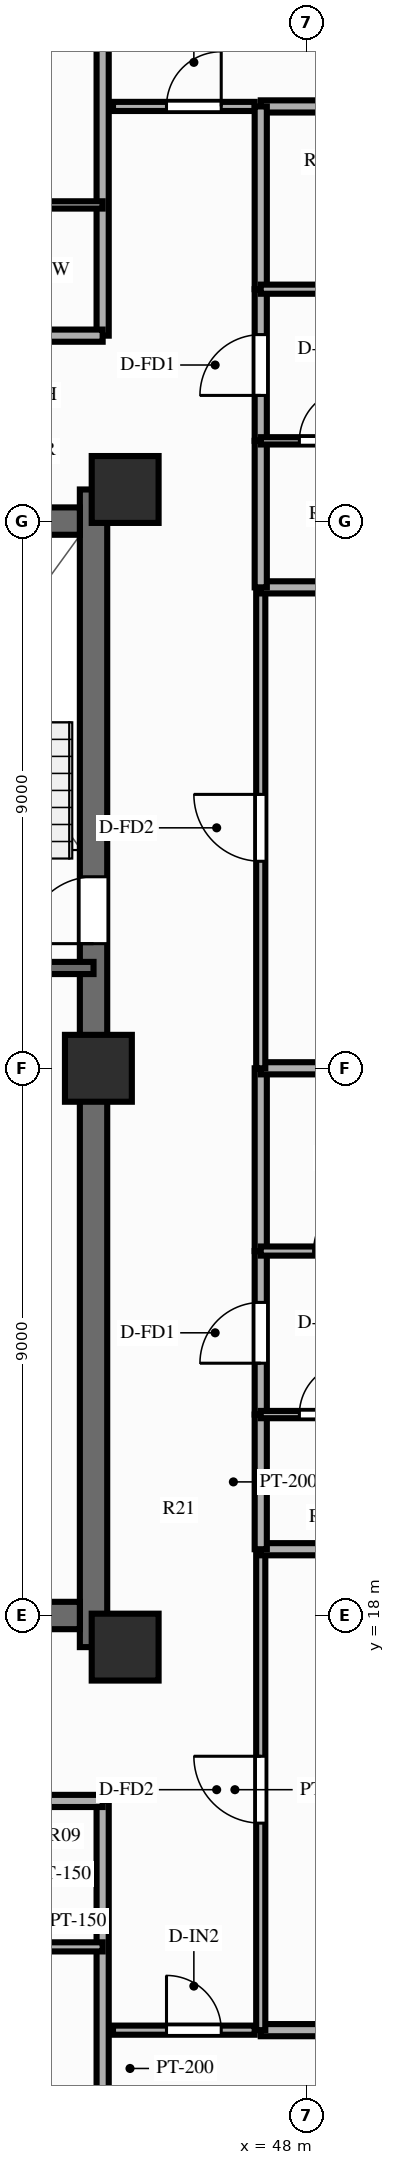
"""IFC4 building model, lengths in metres.
Left out: names, types, materials, properties, quantities, classifications, styles, units other than length and angle.
Written with IfcOpenShell. Run it as: python <this file> out.ifc"""

import sys

from ifc_helpers import new_model, si_unit, direction, frame, frame_2d, origin, origin_2d, place, context, subcontext, project, spatial, rectangle, extrude, source, transform, mapped, element, fill, save


model = new_model("IFC4")
c1 = context("Model", 3, precision=1e-05, world=origin(), true_north=direction((0.0, 1.0)))
c2 = subcontext(c1, "Body", "Model", "MODEL_VIEW")
j1 = project(units=[si_unit("LENGTHUNIT", "METRE"), si_unit("PLANEANGLEUNIT", "RADIAN")], contexts=[c1])
p1 = place(None, origin())
s1 = spatial("IfcSite", under=j1, at=p1, CompositionType="ELEMENT")
p2 = place(p1, origin())
s2 = spatial("IfcBuilding", under=s1, at=p2, CompositionType="ELEMENT")
p3 = place(p2, frame((0.0, 0.0, 186.7)))
s3 = spatial("IfcBuildingStorey", under=s2, at=p3, CompositionType="ELEMENT", Elevation=186.7)
p4 = place(p3, frame((44.5, 17.48, 0.0), z_axis=(0.0, 0.0, 1.0), x_axis=(0.0, 1.0, 0.0)))
e1 = element("IfcWall", 1, at=p4, inside=s3, PredefinedType="SHEAR", context=c2, shape_type="SweptSolid", body=[
    extrude(rectangle(XDim=19.04, YDim=0.45, at=frame_2d((9.52, 0.0))), origin(), (0.0, 0.0, 1.0), 3.0),
])
p5 = place(p4, frame((12.67, 0.0, 0.0), z_axis=(0.0, 0.0, 1.0), x_axis=(-1.0, 0.0, 0.0)))
e2 = element("IfcOpeningElement", 2, at=p5, cuts=e1, PredefinedType="OPENING", context=c2, shape_type="SweptSolid", body=[
    extrude(rectangle(XDim=1.1, YDim=2.15, at=frame_2d((0.55, 1.075))), frame((0.0, 0.237, 0.0), z_axis=(0.0, -1.0, 0.0), x_axis=(1.0, 0.0, 0.0)), (0.0, 0.0, 1.0), 0.474),
])
p6 = place(p3, frame((31.725, 18.0, 0.0), z_axis=(0.0, 0.0, 1.0), x_axis=(1.0, 0.0, 0.0)))
e3 = element("IfcWall", 3, at=p6, inside=s3, PredefinedType="SHEAR", context=c2, shape_type="SweptSolid", body=[
    extrude(rectangle(XDim=12.55, YDim=0.45, at=frame_2d((6.275, 0.0))), origin(), (0.0, 0.0, 1.0), 3.0),
])
p7 = place(p3, frame((31.725, 36.0, 0.0), z_axis=(0.0, 0.0, 1.0), x_axis=(1.0, 0.0, 0.0)))
e4 = element("IfcWall", 4, at=p7, inside=s3, PredefinedType="SHEAR", context=c2, shape_type="SweptSolid", body=[
    extrude(rectangle(XDim=12.55, YDim=0.45, at=frame_2d((6.275, 0.0))), origin(), (0.0, 0.0, 1.0), 3.0),
])
p8 = place(p7, frame((5.225, 0.0, 0.0), z_axis=(0.0, 0.0, 1.0), x_axis=(-1.0, 0.0, 0.0)))
e5 = element("IfcOpeningElement", 5, at=p8, cuts=e4, PredefinedType="OPENING", context=c2, shape_type="SweptSolid", body=[
    extrude(rectangle(XDim=1.4, YDim=2.15, at=frame_2d((0.7, 1.075))), frame((0.0, 0.237, 0.0), z_axis=(0.0, -1.0, 0.0), x_axis=(1.0, 0.0, 0.0)), (0.0, 0.0, 1.0), 0.474),
])
m1 = source(origin(), c2, "Body", "SweptSolid", [
    extrude(rectangle(XDim=1.1, YDim=1.1, at=origin_2d()), origin(), (0.0, 0.0, 1.0), 3.0),
])
for number, where, z_axis, x_axis in (
    (6, (45.02, 17.48, 0.0), (0.0, 0.0, 1.0), (1.0, 0.0, 0.0)),
    (7, (45.02, 36.52, 0.0), (0.0, 0.0, 1.0), (1.0, 0.0, 0.0)),
    (8, (44.58, 27.0, 0.0), (0.0, 0.0, 1.0), (1.0, 0.0, 0.0)),
):
    element("IfcColumn", number, at=place(p3, frame(where, z_axis=z_axis, x_axis=x_axis)), inside=s3, PredefinedType="COLUMN", context=c2, shape_type="MappedRepresentation", body=[
        mapped(m1, transform((0.0, 0.0, 0.0), scale=1.0)),
    ])
p9 = place(p3, frame((40.57, 28.65, 0.0), z_axis=(0.0, 0.0, 1.0), x_axis=(1.0, 0.0, 0.0)))
e9 = element("IfcWall", 9, at=p9, inside=s3, PredefinedType="SOLIDWALL", context=c2, shape_type="SweptSolid", body=[
    extrude(rectangle(XDim=3.93, YDim=0.2, at=frame_2d((1.965, 0.0))), origin(), (0.0, 0.0, 1.0), 2.79),
])
p10 = place(p3, frame((44.82, 11.18, 0.0), z_axis=(0.0, 0.0, 1.0), x_axis=(1.0, 0.0, 0.0)))
e10 = element("IfcWall", 10, at=p10, inside=s3, PredefinedType="PARTITIONING", context=c2, shape_type="SweptSolid", body=[
    extrude(rectangle(XDim=2.33, YDim=0.15, at=frame_2d((1.165, 0.0))), origin(), (0.0, 0.0, 1.0), 2.79),
])
p11 = place(p10, frame((0.88, 0.0, 0.0)))
e11 = element("IfcOpeningElement", 11, at=p11, cuts=e10, PredefinedType="OPENING", context=c2, shape_type="SweptSolid", body=[
    extrude(rectangle(XDim=0.9, YDim=2.1, at=frame_2d((0.45, 1.05))), frame((0.0, 0.087, 0.0), z_axis=(0.0, -1.0, 0.0), x_axis=(1.0, 0.0, 0.0)), (0.0, 0.0, 1.0), 0.174),
])
p12 = place(p3, frame((44.82, 42.82, 0.0), z_axis=(0.0, 0.0, 1.0), x_axis=(1.0, 0.0, 0.0)))
e12 = element("IfcWall", 12, at=p12, inside=s3, PredefinedType="PARTITIONING", context=c2, shape_type="SweptSolid", body=[
    extrude(rectangle(XDim=2.33, YDim=0.15, at=frame_2d((1.165, 0.0))), origin(), (0.0, 0.0, 1.0), 2.79),
])
p13 = place(p12, frame((0.88, 0.0, 0.0)))
e13 = element("IfcOpeningElement", 13, at=p13, cuts=e12, PredefinedType="OPENING", context=c2, shape_type="SweptSolid", body=[
    extrude(rectangle(XDim=0.9, YDim=2.1, at=frame_2d((0.45, 1.05))), frame((0.0, 0.087, 0.0), z_axis=(0.0, -1.0, 0.0), x_axis=(1.0, 0.0, 0.0)), (0.0, 0.0, 1.0), 0.174),
])
p14 = place(p3, frame((44.65, 14.95, 0.0), z_axis=(0.0, 0.0, 1.0), x_axis=(0.0, -1.0, 0.0)))
e14 = element("IfcWall", 14, at=p14, inside=s3, PredefinedType="PARTITIONING", context=c2, shape_type="SweptSolid", body=[
    extrude(rectangle(XDim=8.8, YDim=0.2, at=frame_2d((4.4, 0.0))), origin(), (0.0, 0.0, 1.0), 2.39),
])
p15 = place(p3, frame((42.022, 14.95, 0.0), z_axis=(0.0, 0.0, 1.0), x_axis=(1.0, 0.0, 0.0)))
e15 = element("IfcWall", 15, at=p15, inside=s3, PredefinedType="PARTITIONING", context=c2, shape_type="SweptSolid", body=[
    extrude(rectangle(XDim=2.628, YDim=0.2, at=frame_2d((1.314, 0.0))), origin(), (0.0, 0.0, 1.0), 2.79),
])
p16 = place(p3, frame((42.022, 12.55, 0.0), z_axis=(0.0, 0.0, 1.0), x_axis=(1.0, 0.0, 0.0)))
e16 = element("IfcWall", 16, at=p16, inside=s3, PredefinedType="PARTITIONING", context=c2, shape_type="SweptSolid", body=[
    extrude(rectangle(XDim=2.628, YDim=0.15, at=frame_2d((1.314, 0.0))), origin(), (0.0, 0.0, 1.0), 2.79),
])
p17 = place(p3, frame((44.65, 39.05, 0.0), z_axis=(0.0, 0.0, 1.0), x_axis=(0.0, 1.0, 0.0)))
e17 = element("IfcWall", 17, at=p17, inside=s3, PredefinedType="PARTITIONING", context=c2, shape_type="SweptSolid", body=[
    extrude(rectangle(XDim=8.8, YDim=0.2, at=frame_2d((4.4, 0.0))), origin(), (0.0, 0.0, 1.0), 2.39),
])
p18 = place(p3, frame((42.188, 39.05, 0.0), z_axis=(0.0, 0.0, 1.0), x_axis=(1.0, 0.0, 0.0)))
e18 = element("IfcWall", 18, at=p18, inside=s3, PredefinedType="PARTITIONING", context=c2, shape_type="SweptSolid", body=[
    extrude(rectangle(XDim=2.462, YDim=0.2, at=frame_2d((1.231, 0.0))), origin(), (0.0, 0.0, 1.0), 2.79),
])
p19 = place(p3, frame((42.188, 41.2, 0.0), z_axis=(0.0, 0.0, 1.0), x_axis=(1.0, 0.0, 0.0)))
e19 = element("IfcWall", 19, at=p19, inside=s3, PredefinedType="PARTITIONING", context=c2, shape_type="SweptSolid", body=[
    extrude(rectangle(XDim=2.462, YDim=0.12, at=frame_2d((1.231, 0.0))), origin(), (0.0, 0.0, 1.0), 2.79),
])
for number, where, z_axis, x_axis in (
    (20, (47.25, 11.18, 0.0), (0.0, 0.0, 1.0), (1.0, 0.0, 0.0)),
    (21, (47.25, 42.82, 0.0), (0.0, 0.0, 1.0), (1.0, 0.0, 0.0)),
):
    element("IfcWall", number, at=place(p3, frame(where, z_axis=z_axis, x_axis=x_axis)), inside=s3, PredefinedType="PARTITIONING", context=c2, shape_type="SweptSolid", body=[
        extrude(rectangle(XDim=10.85, YDim=0.2, at=frame_2d((5.425, 0.0))), origin(), (0.0, 0.0, 1.0), 2.79),
    ])
p20 = place(p3, frame((47.25, 11.18, 0.0), z_axis=(0.0, 0.0, 1.0), x_axis=(0.0, 1.0, 0.0)))
e22 = element("IfcWall", 22, at=p20, inside=s3, PredefinedType="PARTITIONING", context=c2, shape_type="SweptSolid", body=[
    extrude(rectangle(XDim=7.91, YDim=0.15, at=frame_2d((3.955, 0.0))), origin(), (0.0, 0.0, 1.0), 2.79),
])
p21 = place(p20, frame((3.405, 0.0, 0.0)))
e23 = element("IfcOpeningElement", 23, at=p21, cuts=e22, PredefinedType="OPENING", context=c2, shape_type="SweptSolid", body=[
    extrude(rectangle(XDim=1.1, YDim=2.15, at=frame_2d((0.55, 1.075))), frame((0.0, 0.087, 0.0), z_axis=(0.0, -1.0, 0.0), x_axis=(1.0, 0.0, 0.0)), (0.0, 0.0, 1.0), 0.174),
])
p22 = place(p3, frame((47.25, 19.09, 0.0), z_axis=(0.0, 0.0, 1.0), x_axis=(1.0, 0.0, 0.0)))
e24 = element("IfcWall", 24, at=p22, inside=s3, PredefinedType="PARTITIONING", context=c2, shape_type="SweptSolid", body=[
    extrude(rectangle(XDim=10.85, YDim=0.2, at=frame_2d((5.425, 0.0))), origin(), (0.0, 0.0, 1.0), 2.79),
])
p23 = place(p3, frame((47.25, 19.09, 0.0), z_axis=(0.0, 0.0, 1.0), x_axis=(0.0, 1.0, 0.0)))
e25 = element("IfcWall", 25, at=p23, inside=s3, PredefinedType="PARTITIONING", context=c2, shape_type="SweptSolid", body=[
    extrude(rectangle(XDim=2.215, YDim=0.2, at=frame_2d((1.107, 0.0))), origin(), (0.0, 0.0, 1.0), 2.79),
])
p24 = place(p3, frame((47.25, 21.305, 0.0), z_axis=(0.0, 0.0, 1.0), x_axis=(0.0, 1.0, 0.0)))
e26 = element("IfcWall", 26, at=p24, inside=s3, PredefinedType="PARTITIONING", context=c2, shape_type="SweptSolid", body=[
    extrude(rectangle(XDim=2.689, YDim=0.2, at=frame_2d((1.345, 0.0))), origin(), (0.0, 0.0, 1.0), 2.79),
])
p25 = place(p24, frame((0.845, 0.0, 0.0)))
e27 = element("IfcOpeningElement", 27, at=p25, cuts=e26, PredefinedType="OPENING", context=c2, shape_type="SweptSolid", body=[
    extrude(rectangle(XDim=1.0, YDim=2.15, at=frame_2d((0.5, 1.075))), frame((0.0, 0.112, 0.0), z_axis=(0.0, -1.0, 0.0), x_axis=(1.0, 0.0, 0.0)), (0.0, 0.0, 1.0), 0.224),
])
p26 = place(p3, frame((47.25, 23.994, 0.0), z_axis=(0.0, 0.0, 1.0), x_axis=(0.0, 1.0, 0.0)))
e28 = element("IfcWall", 28, at=p26, inside=s3, PredefinedType="PARTITIONING", context=c2, shape_type="SweptSolid", body=[
    extrude(rectangle(XDim=3.006, YDim=0.2, at=frame_2d((1.503, 0.0))), origin(), (0.0, 0.0, 1.0), 2.79),
])
p27 = place(p3, frame((47.25, 21.305, 0.0), z_axis=(0.0, 0.0, 1.0), x_axis=(1.0, 0.0, 0.0)))
e29 = element("IfcWall", 29, at=p27, inside=s3, PredefinedType="PARTITIONING", context=c2, shape_type="SweptSolid", body=[
    extrude(rectangle(XDim=2.12, YDim=0.12, at=frame_2d((1.06, 0.0))), origin(), (0.0, 0.0, 1.0), 2.79),
])
p28 = place(p27, frame((0.635, 0.0, 0.0)))
e30 = element("IfcOpeningElement", 30, at=p28, cuts=e29, PredefinedType="OPENING", context=c2, shape_type="SweptSolid", body=[
    extrude(rectangle(XDim=0.85, YDim=2.05, at=frame_2d((0.425, 1.025))), frame((0.0, 0.072, 0.0), z_axis=(0.0, -1.0, 0.0), x_axis=(1.0, 0.0, 0.0)), (0.0, 0.0, 1.0), 0.144),
])
p29 = place(p3, frame((47.25, 23.994, 0.0), z_axis=(0.0, 0.0, 1.0), x_axis=(1.0, 0.0, 0.0)))
e31 = element("IfcWall", 31, at=p29, inside=s3, PredefinedType="PARTITIONING", context=c2, shape_type="SweptSolid", body=[
    extrude(rectangle(XDim=2.64, YDim=0.15, at=frame_2d((1.32, 0.0))), origin(), (0.0, 0.0, 1.0), 2.79),
])
p30 = place(p29, frame((0.87, 0.0, 0.0)))
e32 = element("IfcOpeningElement", 32, at=p30, cuts=e31, PredefinedType="OPENING", context=c2, shape_type="SweptSolid", body=[
    extrude(rectangle(XDim=0.9, YDim=2.1, at=frame_2d((0.45, 1.05))), frame((0.0, 0.087, 0.0), z_axis=(0.0, -1.0, 0.0), x_axis=(1.0, 0.0, 0.0)), (0.0, 0.0, 1.0), 0.174),
])
p31 = place(p3, frame((47.25, 27.0, 0.0), z_axis=(0.0, 0.0, 1.0), x_axis=(1.0, 0.0, 0.0)))
e33 = element("IfcWall", 33, at=p31, inside=s3, PredefinedType="PARTITIONING", context=c2, shape_type="SweptSolid", body=[
    extrude(rectangle(XDim=10.85, YDim=0.2, at=frame_2d((5.425, 0.0))), origin(), (0.0, 0.0, 1.0), 2.79),
])
p32 = place(p3, frame((47.25, 27.0, 0.0), z_axis=(0.0, 0.0, 1.0), x_axis=(0.0, 1.0, 0.0)))
e34 = element("IfcWall", 34, at=p32, inside=s3, PredefinedType="PARTITIONING", context=c2, shape_type="SweptSolid", body=[
    extrude(rectangle(XDim=7.91, YDim=0.15, at=frame_2d((3.955, 0.0))), origin(), (0.0, 0.0, 1.0), 2.79),
])
p33 = place(p32, frame((3.405, 0.0, 0.0)))
e35 = element("IfcOpeningElement", 35, at=p33, cuts=e34, PredefinedType="OPENING", context=c2, shape_type="SweptSolid", body=[
    extrude(rectangle(XDim=1.1, YDim=2.15, at=frame_2d((0.55, 1.075))), frame((0.0, 0.087, 0.0), z_axis=(0.0, -1.0, 0.0), x_axis=(1.0, 0.0, 0.0)), (0.0, 0.0, 1.0), 0.174),
])
p34 = place(p3, frame((47.25, 34.91, 0.0), z_axis=(0.0, 0.0, 1.0), x_axis=(1.0, 0.0, 0.0)))
e36 = element("IfcWall", 36, at=p34, inside=s3, PredefinedType="PARTITIONING", context=c2, shape_type="SweptSolid", body=[
    extrude(rectangle(XDim=10.85, YDim=0.2, at=frame_2d((5.425, 0.0))), origin(), (0.0, 0.0, 1.0), 2.79),
])
p35 = place(p3, frame((47.25, 34.91, 0.0), z_axis=(0.0, 0.0, 1.0), x_axis=(0.0, 1.0, 0.0)))
e37 = element("IfcWall", 37, at=p35, inside=s3, PredefinedType="PARTITIONING", context=c2, shape_type="SweptSolid", body=[
    extrude(rectangle(XDim=2.41, YDim=0.2, at=frame_2d((1.205, 0.0))), origin(), (0.0, 0.0, 1.0), 2.79),
])
p36 = place(p3, frame((47.25, 37.32, 0.0), z_axis=(0.0, 0.0, 1.0), x_axis=(0.0, 1.0, 0.0)))
e38 = element("IfcWall", 38, at=p36, inside=s3, PredefinedType="PARTITIONING", context=c2, shape_type="SweptSolid", body=[
    extrude(rectangle(XDim=2.494, YDim=0.2, at=frame_2d((1.247, 0.0))), origin(), (0.0, 0.0, 1.0), 2.79),
])
p37 = place(p36, frame((0.747, 0.0, 0.0)))
e39 = element("IfcOpeningElement", 39, at=p37, cuts=e38, PredefinedType="OPENING", context=c2, shape_type="SweptSolid", body=[
    extrude(rectangle(XDim=1.0, YDim=2.15, at=frame_2d((0.5, 1.075))), frame((0.0, 0.112, 0.0), z_axis=(0.0, -1.0, 0.0), x_axis=(1.0, 0.0, 0.0)), (0.0, 0.0, 1.0), 0.224),
])
p38 = place(p3, frame((47.25, 39.814, 0.0), z_axis=(0.0, 0.0, 1.0), x_axis=(0.0, 1.0, 0.0)))
e40 = element("IfcWall", 40, at=p38, inside=s3, PredefinedType="PARTITIONING", context=c2, shape_type="SweptSolid", body=[
    extrude(rectangle(XDim=3.006, YDim=0.2, at=frame_2d((1.503, 0.0))), origin(), (0.0, 0.0, 1.0), 2.79),
])
p39 = place(p3, frame((47.25, 37.32, 0.0), z_axis=(0.0, 0.0, 1.0), x_axis=(1.0, 0.0, 0.0)))
e41 = element("IfcWall", 41, at=p39, inside=s3, PredefinedType="PARTITIONING", context=c2, shape_type="SweptSolid", body=[
    extrude(rectangle(XDim=2.12, YDim=0.12, at=frame_2d((1.06, 0.0))), origin(), (0.0, 0.0, 1.0), 2.79),
])
p40 = place(p39, frame((0.635, 0.0, 0.0)))
e42 = element("IfcOpeningElement", 42, at=p40, cuts=e41, PredefinedType="OPENING", context=c2, shape_type="SweptSolid", body=[
    extrude(rectangle(XDim=0.85, YDim=2.05, at=frame_2d((0.425, 1.025))), frame((0.0, 0.072, 0.0), z_axis=(0.0, -1.0, 0.0), x_axis=(1.0, 0.0, 0.0)), (0.0, 0.0, 1.0), 0.144),
])
p41 = place(p3, frame((47.25, 39.814, 0.0), z_axis=(0.0, 0.0, 1.0), x_axis=(1.0, 0.0, 0.0)))
e43 = element("IfcWall", 43, at=p41, inside=s3, PredefinedType="PARTITIONING", context=c2, shape_type="SweptSolid", body=[
    extrude(rectangle(XDim=2.88, YDim=0.15, at=frame_2d((1.44, 0.0))), origin(), (0.0, 0.0, 1.0), 2.79),
])
p42 = place(p41, frame((0.99, 0.0, 0.0)))
e44 = element("IfcOpeningElement", 44, at=p42, cuts=e43, PredefinedType="OPENING", context=c2, shape_type="SweptSolid", body=[
    extrude(rectangle(XDim=0.9, YDim=2.1, at=frame_2d((0.45, 1.05))), frame((0.0, 0.087, 0.0), z_axis=(0.0, -1.0, 0.0), x_axis=(1.0, 0.0, 0.0)), (0.0, 0.0, 1.0), 0.174),
])
m2 = source(origin(), c2, "Body", "SweptSolid", [
    extrude(rectangle(XDim=1.1, YDim=2.15, at=frame_2d((0.55, 1.075))), frame((0.0, 0.025, 0.0), z_axis=(0.0, -1.0, 0.0), x_axis=(1.0, 0.0, 0.0)), (0.0, 0.0, 1.0), 0.05),
])
p43 = place(p5, origin())
e45 = element("IfcDoor", 45, at=p43, inside=s3, OperationType="SINGLE_SWING_RIGHT", PredefinedType="DOOR", context=c2, shape_type="MappedRepresentation", body=[
    mapped(m2, transform((0.0, 0.0, 0.0), scale=1.0)),
])
fill(e2, e45)
m3 = source(origin(), c2, "Body", "SweptSolid", [
    extrude(rectangle(XDim=0.9, YDim=2.1, at=frame_2d((0.45, 1.05))), frame((0.0, 0.025, 0.0), z_axis=(0.0, -1.0, 0.0), x_axis=(1.0, 0.0, 0.0)), (0.0, 0.0, 1.0), 0.05),
])
p44 = place(p11, origin())
e46 = element("IfcDoor", 46, at=p44, inside=s3, OperationType="SINGLE_SWING_LEFT", PredefinedType="DOOR", context=c2, shape_type="MappedRepresentation", body=[
    mapped(m3, transform((0.0, 0.0, 0.0), scale=1.0)),
])
fill(e11, e46)
p45 = place(p13, origin())
e47 = element("IfcDoor", 47, at=p45, inside=s3, OperationType="SINGLE_SWING_RIGHT", PredefinedType="DOOR", context=c2, shape_type="MappedRepresentation", body=[
    mapped(m3, transform((0.0, 0.0, 0.0), scale=1.0)),
])
fill(e13, e47)
p46 = place(p21, origin())
e48 = element("IfcDoor", 48, at=p46, inside=s3, OperationType="SINGLE_SWING_RIGHT", PredefinedType="DOOR", context=c2, shape_type="MappedRepresentation", body=[
    mapped(m2, transform((0.0, 0.0, 0.0), scale=1.0)),
])
fill(e23, e48)
m4 = source(origin(), c2, "Body", "SweptSolid", [
    extrude(rectangle(XDim=1.0, YDim=2.15, at=frame_2d((0.5, 1.075))), frame((0.0, 0.025, 0.0), z_axis=(0.0, -1.0, 0.0), x_axis=(1.0, 0.0, 0.0)), (0.0, 0.0, 1.0), 0.05),
])
p47 = place(p25, origin())
e49 = element("IfcDoor", 49, at=p47, inside=s3, OperationType="SINGLE_SWING_LEFT", PredefinedType="DOOR", context=c2, shape_type="MappedRepresentation", body=[
    mapped(m4, transform((0.0, 0.0, 0.0), scale=1.0)),
])
fill(e27, e49)
m5 = source(origin(), c2, "Body", "SweptSolid", [
    extrude(rectangle(XDim=0.85, YDim=2.05, at=frame_2d((0.425, 1.025))), frame((0.0, 0.025, 0.0), z_axis=(0.0, -1.0, 0.0), x_axis=(1.0, 0.0, 0.0)), (0.0, 0.0, 1.0), 0.05),
])
p48 = place(p28, origin())
e50 = element("IfcDoor", 50, at=p48, inside=s3, OperationType="SINGLE_SWING_RIGHT", PredefinedType="DOOR", context=c2, shape_type="MappedRepresentation", body=[
    mapped(m5, transform((0.0, 0.0, 0.0), scale=1.0)),
])
fill(e30, e50)
p49 = place(p30, origin())
e51 = element("IfcDoor", 51, at=p49, inside=s3, OperationType="SINGLE_SWING_RIGHT", PredefinedType="DOOR", context=c2, shape_type="MappedRepresentation", body=[
    mapped(m3, transform((0.0, 0.0, 0.0), scale=1.0)),
])
fill(e32, e51)
p50 = place(p33, origin())
e52 = element("IfcDoor", 52, at=p50, inside=s3, OperationType="SINGLE_SWING_RIGHT", PredefinedType="DOOR", context=c2, shape_type="MappedRepresentation", body=[
    mapped(m2, transform((0.0, 0.0, 0.0), scale=1.0)),
])
fill(e35, e52)
p51 = place(p37, origin())
e53 = element("IfcDoor", 53, at=p51, inside=s3, OperationType="SINGLE_SWING_LEFT", PredefinedType="DOOR", context=c2, shape_type="MappedRepresentation", body=[
    mapped(m4, transform((0.0, 0.0, 0.0), scale=1.0)),
])
fill(e39, e53)
p52 = place(p40, origin())
e54 = element("IfcDoor", 54, at=p52, inside=s3, OperationType="SINGLE_SWING_RIGHT", PredefinedType="DOOR", context=c2, shape_type="MappedRepresentation", body=[
    mapped(m5, transform((0.0, 0.0, 0.0), scale=1.0)),
])
fill(e42, e54)
save(model, sys.argv[1])
